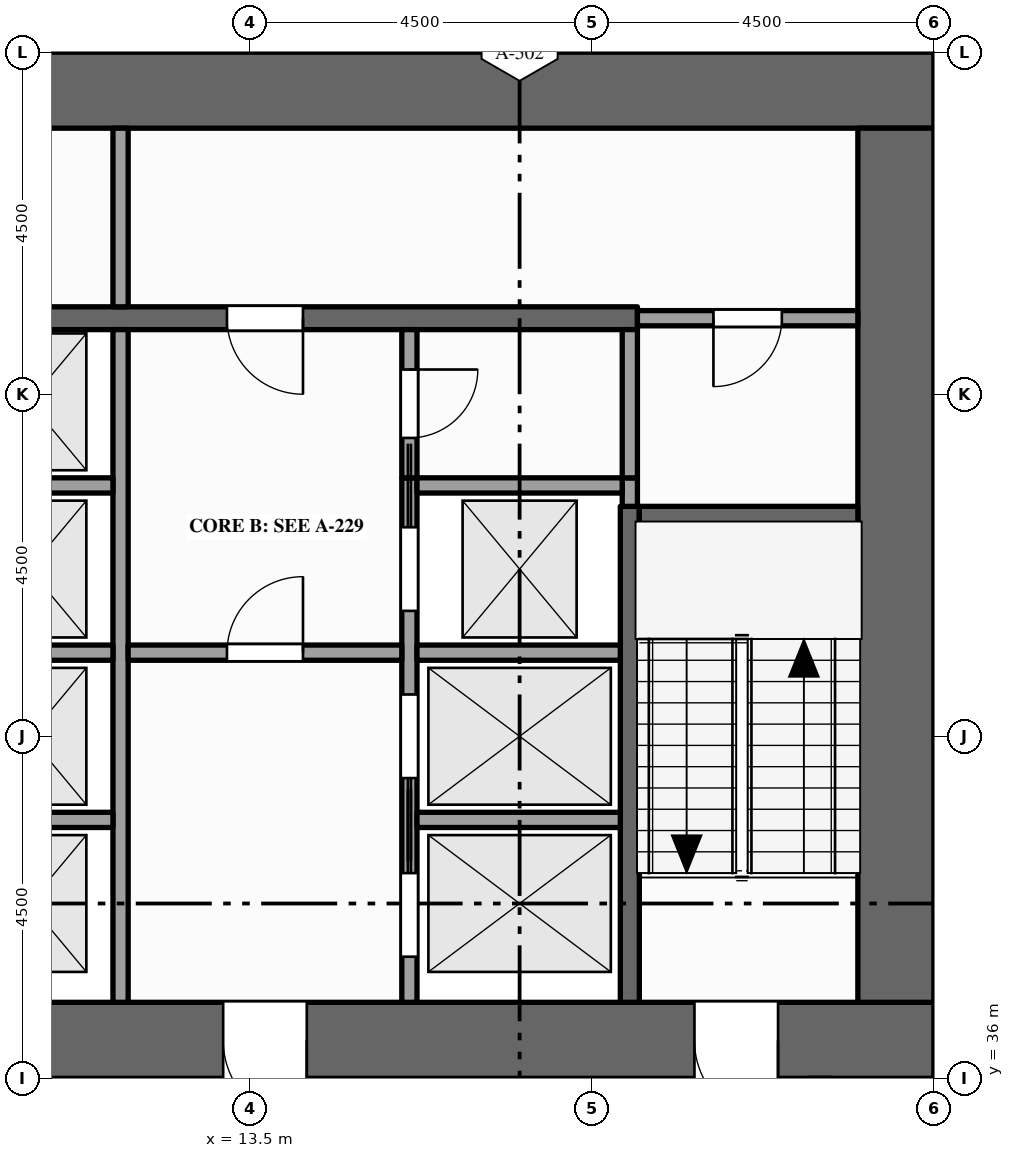
"""IFC4 building model, lengths in metres.
Left out: names, types, materials, properties, quantities, classifications, styles, units other than length and angle.
Written with IfcOpenShell. Run it as: python <this file> out.ifc"""

import sys

from ifc_helpers import new_model, si_unit, direction, frame, frame_2d, origin, place, context, subcontext, project, spatial, rectangle, extrude, element, fill, save


model = new_model("IFC4")
c1 = context("Model", 3, precision=1e-05, world=origin(), true_north=direction((0.0, 1.0)))
c2 = subcontext(c1, "Body", "Model", "MODEL_VIEW")
j1 = project(units=[si_unit("LENGTHUNIT", "METRE"), si_unit("PLANEANGLEUNIT", "RADIAN")], contexts=[c1])
p1 = place(None, origin())
s1 = spatial("IfcSite", under=j1, at=p1, CompositionType="ELEMENT")
p2 = place(p1, origin())
s2 = spatial("IfcBuilding", under=s1, at=p2, CompositionType="ELEMENT")
p3 = place(p2, frame((0.0, 0.0, 155.0)))
s3 = spatial("IfcBuildingStorey", under=s2, at=p3, CompositionType="ELEMENT", Elevation=155.0)
p4 = place(p3, frame((0.0, 36.5, -0.15), z_axis=(0.0, 0.0, 1.0), x_axis=(1.0, 0.0, 0.0)))
e1 = element("IfcWall", 1, at=p4, inside=s3, PredefinedType="SHEAR", context=c2, shape_type="SweptSolid", body=[
    extrude(rectangle(XDim=22.5, YDim=1.0, at=frame_2d((11.25, 0.0))), origin(), (0.0, 0.0, 1.0), 4.0),
])
p5 = place(p4, frame((7.1, 0.0, 0.15)))
e2 = element("IfcOpeningElement", 2, at=p5, cuts=e1, PredefinedType="OPENING", context=c2, shape_type="SweptSolid", body=[
    extrude(rectangle(XDim=1.8, YDim=2.1, at=frame_2d((0.9, 1.05))), frame((0.0, 0.51, 0.0), z_axis=(0.0, -1.0, 0.0), x_axis=(1.0, 0.0, 0.0)), (0.0, 0.0, 1.0), 1.02),
])
p6 = place(p4, frame((13.15, 0.0, 0.15)))
e3 = element("IfcOpeningElement", 3, at=p6, cuts=e1, PredefinedType="OPENING", context=c2, shape_type="SweptSolid", body=[
    extrude(rectangle(XDim=1.1, YDim=2.1, at=frame_2d((0.55, 1.05))), frame((0.0, 0.51, 0.0), z_axis=(0.0, -1.0, 0.0), x_axis=(1.0, 0.0, 0.0)), (0.0, 0.0, 1.0), 1.02),
])
p7 = place(p4, frame((2.15, 0.0, 0.15)))
e4 = element("IfcOpeningElement", 4, at=p7, cuts=e1, PredefinedType="OPENING", context=c2, shape_type="SweptSolid", body=[
    extrude(rectangle(XDim=1.1, YDim=2.1, at=frame_2d((0.55, 1.05))), frame((0.0, 0.51, 0.0), z_axis=(0.0, -1.0, 0.0), x_axis=(1.0, 0.0, 0.0)), (0.0, 0.0, 1.0), 1.02),
])
p8 = place(p4, frame((19.35, 0.0, 0.15)))
e5 = element("IfcOpeningElement", 5, at=p8, cuts=e1, PredefinedType="OPENING", context=c2, shape_type="SweptSolid", body=[
    extrude(rectangle(XDim=1.1, YDim=2.1, at=frame_2d((0.55, 1.05))), frame((0.0, 0.51, 0.0), z_axis=(0.0, -1.0, 0.0), x_axis=(1.0, 0.0, 0.0)), (0.0, 0.0, 1.0), 1.02),
])
p9 = place(p3, frame((0.0, 49.0, -0.15), z_axis=(0.0, 0.0, 1.0), x_axis=(1.0, 0.0, 0.0)))
e6 = element("IfcWall", 6, at=p9, inside=s3, PredefinedType="SHEAR", context=c2, shape_type="SweptSolid", body=[
    extrude(rectangle(XDim=22.5, YDim=1.0, at=frame_2d((11.25, 0.0))), origin(), (0.0, 0.0, 1.0), 4.0),
])
p10 = place(p3, frame((22.0, 37.0, -0.15), z_axis=(0.0, 0.0, 1.0), x_axis=(0.0, 1.0, 0.0)))
e7 = element("IfcWall", 7, at=p10, inside=s3, PredefinedType="SHEAR", context=c2, shape_type="SweptSolid", body=[
    extrude(rectangle(XDim=11.5, YDim=1.0, at=frame_2d((5.75, 0.0))), origin(), (0.0, 0.0, 1.0), 4.0),
])
p11 = place(p3, frame((11.8, 37.0, 0.0), z_axis=(0.0, 0.0, 1.0), x_axis=(0.0, 1.0, 0.0)))
e8 = element("IfcWall", 8, at=p11, inside=s3, PredefinedType="SOLIDWALL", context=c2, shape_type="SweptSolid", body=[
    extrude(rectangle(XDim=8.85, YDim=0.2, at=frame_2d((4.425, 0.0))), origin(), (0.0, 0.0, 1.0), 3.85),
])
p12 = place(p3, frame((11.8, 46.15, 0.0), z_axis=(0.0, 0.0, 1.0), x_axis=(0.0, 1.0, 0.0)))
e9 = element("IfcWall", 9, at=p12, inside=s3, PredefinedType="PARTITIONING", context=c2, shape_type="SweptSolid", body=[
    extrude(rectangle(XDim=2.35, YDim=0.2, at=frame_2d((1.175, 0.0))), origin(), (0.0, 0.0, 1.0), 3.85),
])
p13 = place(p3, frame((15.6, 37.0, 0.0), z_axis=(0.0, 0.0, 1.0), x_axis=(0.0, 1.0, 0.0)))
e10 = element("IfcWall", 10, at=p13, inside=s3, PredefinedType="SOLIDWALL", context=c2, shape_type="SweptSolid", body=[
    extrude(rectangle(XDim=6.9, YDim=0.2, at=frame_2d((3.45, 0.0))), origin(), (0.0, 0.0, 1.0), 3.85),
])
p14 = place(p13, frame((0.6, 0.0, 0.012)))
e11 = element("IfcOpeningElement", 11, at=p14, cuts=e10, PredefinedType="OPENING", context=c2, shape_type="SweptSolid", body=[
    extrude(rectangle(XDim=1.1, YDim=2.1, at=frame_2d((0.55, 1.05))), frame((0.0, 0.11, 0.0), z_axis=(0.0, -1.0, 0.0), x_axis=(1.0, 0.0, 0.0)), (0.0, 0.0, 1.0), 0.22),
])
p15 = place(p13, frame((2.95, 0.0, 0.012)))
e12 = element("IfcOpeningElement", 12, at=p15, cuts=e10, PredefinedType="OPENING", context=c2, shape_type="SweptSolid", body=[
    extrude(rectangle(XDim=1.1, YDim=2.1, at=frame_2d((0.55, 1.05))), frame((0.0, 0.11, 0.0), z_axis=(0.0, -1.0, 0.0), x_axis=(1.0, 0.0, 0.0)), (0.0, 0.0, 1.0), 0.22),
])
p16 = place(p13, frame((5.15, 0.0, 0.012)))
e13 = element("IfcOpeningElement", 13, at=p16, cuts=e10, PredefinedType="OPENING", context=c2, shape_type="SweptSolid", body=[
    extrude(rectangle(XDim=1.1, YDim=2.1, at=frame_2d((0.55, 1.05))), frame((0.0, 0.11, 0.0), z_axis=(0.0, -1.0, 0.0), x_axis=(1.0, 0.0, 0.0)), (0.0, 0.0, 1.0), 0.22),
])
p17 = place(p3, frame((15.6, 43.9, 0.0), z_axis=(0.0, 0.0, 1.0), x_axis=(0.0, 1.0, 0.0)))
e14 = element("IfcWall", 14, at=p17, inside=s3, PredefinedType="PARTITIONING", context=c2, shape_type="SweptSolid", body=[
    extrude(rectangle(XDim=1.95, YDim=0.2, at=frame_2d((0.975, 0.0))), origin(), (0.0, 0.0, 1.0), 3.85),
])
p18 = place(p17, frame((0.525, 0.0, 0.0)))
e15 = element("IfcOpeningElement", 15, at=p18, cuts=e14, PredefinedType="OPENING", context=c2, shape_type="SweptSolid", body=[
    extrude(rectangle(XDim=0.9, YDim=2.1, at=frame_2d((0.45, 1.05))), frame((0.0, 0.11, 0.0), z_axis=(0.0, -1.0, 0.0), x_axis=(1.0, 0.0, 0.0)), (0.0, 0.0, 1.0), 0.22),
])
p19 = place(p3, frame((18.5, 37.0, 0.0), z_axis=(0.0, 0.0, 1.0), x_axis=(0.0, 1.0, 0.0)))
e16 = element("IfcWall", 16, at=p19, inside=s3, PredefinedType="SHEAR", context=c2, shape_type="SweptSolid", body=[
    extrude(rectangle(XDim=6.525, YDim=0.25, at=frame_2d((3.262, 0.0))), origin(), (0.0, 0.0, 1.0), 3.85),
])
p20 = place(p3, frame((18.5, 43.525, 0.0), z_axis=(0.0, 0.0, 1.0), x_axis=(0.0, 1.0, 0.0)))
e17 = element("IfcWall", 17, at=p20, inside=s3, PredefinedType="SOLIDWALL", context=c2, shape_type="SweptSolid", body=[
    extrude(rectangle(XDim=0.375, YDim=0.2, at=frame_2d((0.188, 0.0))), origin(), (0.0, 0.0, 1.0), 3.85),
])
p21 = place(p3, frame((18.5, 43.9, 0.0), z_axis=(0.0, 0.0, 1.0), x_axis=(0.0, 1.0, 0.0)))
e18 = element("IfcWall", 18, at=p21, inside=s3, PredefinedType="PARTITIONING", context=c2, shape_type="SweptSolid", body=[
    extrude(rectangle(XDim=1.95, YDim=0.2, at=frame_2d((0.975, 0.0))), origin(), (0.0, 0.0, 1.0), 3.85),
])
p22 = place(p3, frame((9.5, 39.4, 0.0), z_axis=(0.0, 0.0, 1.0), x_axis=(1.0, 0.0, 0.0)))
e19 = element("IfcWall", 19, at=p22, inside=s3, PredefinedType="SOLIDWALL", context=c2, shape_type="SweptSolid", body=[
    extrude(rectangle(XDim=2.2, YDim=0.2, at=frame_2d((1.1, 0.0))), origin(), (0.0, 0.0, 1.0), 3.85),
])
p23 = place(p3, frame((15.7, 39.4, 0.0), z_axis=(0.0, 0.0, 1.0), x_axis=(1.0, 0.0, 0.0)))
e20 = element("IfcWall", 20, at=p23, inside=s3, PredefinedType="SOLIDWALL", context=c2, shape_type="SweptSolid", body=[
    extrude(rectangle(XDim=2.675, YDim=0.2, at=frame_2d((1.337, 0.0))), origin(), (0.0, 0.0, 1.0), 3.85),
])
p24 = place(p3, frame((9.5, 41.6, 0.0), z_axis=(0.0, 0.0, 1.0), x_axis=(1.0, 0.0, 0.0)))
e21 = element("IfcWall", 21, at=p24, inside=s3, PredefinedType="SOLIDWALL", context=c2, shape_type="SweptSolid", body=[
    extrude(rectangle(XDim=2.2, YDim=0.2, at=frame_2d((1.1, 0.0))), origin(), (0.0, 0.0, 1.0), 3.85),
])
p25 = place(p3, frame((11.9, 41.6, 0.0), z_axis=(0.0, 0.0, 1.0), x_axis=(1.0, 0.0, 0.0)))
e22 = element("IfcWall", 22, at=p25, inside=s3, PredefinedType="PARTITIONING", context=c2, shape_type="SweptSolid", body=[
    extrude(rectangle(XDim=3.6, YDim=0.2, at=frame_2d((1.8, 0.0))), origin(), (0.0, 0.0, 1.0), 3.85),
])
p26 = place(p25, frame((1.3, 0.0, 0.0)))
e23 = element("IfcOpeningElement", 23, at=p26, cuts=e22, PredefinedType="OPENING", context=c2, shape_type="SweptSolid", body=[
    extrude(rectangle(XDim=1.0, YDim=2.1, at=frame_2d((0.5, 1.05))), frame((0.0, 0.11, 0.0), z_axis=(0.0, -1.0, 0.0), x_axis=(1.0, 0.0, 0.0)), (0.0, 0.0, 1.0), 0.22),
])
p27 = place(p3, frame((15.7, 41.6, 0.0), z_axis=(0.0, 0.0, 1.0), x_axis=(1.0, 0.0, 0.0)))
e24 = element("IfcWall", 24, at=p27, inside=s3, PredefinedType="SOLIDWALL", context=c2, shape_type="SweptSolid", body=[
    extrude(rectangle(XDim=2.675, YDim=0.2, at=frame_2d((1.337, 0.0))), origin(), (0.0, 0.0, 1.0), 3.85),
])
p28 = place(p3, frame((18.625, 43.4, 0.0), z_axis=(0.0, 0.0, 1.0), x_axis=(1.0, 0.0, 0.0)))
e25 = element("IfcWall", 25, at=p28, inside=s3, PredefinedType="SHEAR", context=c2, shape_type="SweptSolid", body=[
    extrude(rectangle(XDim=2.875, YDim=0.25, at=frame_2d((1.438, 0.0))), origin(), (0.0, 0.0, 1.0), 3.85),
])
p29 = place(p3, frame((9.5, 43.8, 0.0), z_axis=(0.0, 0.0, 1.0), x_axis=(1.0, 0.0, 0.0)))
e26 = element("IfcWall", 26, at=p29, inside=s3, PredefinedType="SOLIDWALL", context=c2, shape_type="SweptSolid", body=[
    extrude(rectangle(XDim=2.2, YDim=0.2, at=frame_2d((1.1, 0.0))), origin(), (0.0, 0.0, 1.0), 3.85),
])
p30 = place(p3, frame((15.7, 43.8, 0.0), z_axis=(0.0, 0.0, 1.0), x_axis=(1.0, 0.0, 0.0)))
e27 = element("IfcWall", 27, at=p30, inside=s3, PredefinedType="SOLIDWALL", context=c2, shape_type="SweptSolid", body=[
    extrude(rectangle(XDim=2.7, YDim=0.2, at=frame_2d((1.35, 0.0))), origin(), (0.0, 0.0, 1.0), 3.85),
])
p31 = place(p3, frame((4.1, 46.0, 0.0), z_axis=(0.0, 0.0, 1.0), x_axis=(1.0, 0.0, 0.0)))
e28 = element("IfcWall", 28, at=p31, inside=s3, PredefinedType="SHEAR", context=c2, shape_type="SweptSolid", body=[
    extrude(rectangle(XDim=14.5, YDim=0.3, at=frame_2d((7.25, 0.0))), origin(), (0.0, 0.0, 1.0), 3.85),
])
p32 = place(p31, frame((3.4, 0.0, 0.0)))
e29 = element("IfcOpeningElement", 29, at=p32, cuts=e28, PredefinedType="OPENING", context=c2, shape_type="SweptSolid", body=[
    extrude(rectangle(XDim=1.0, YDim=2.1, at=frame_2d((0.5, 1.05))), frame((0.0, 0.16, 0.0), z_axis=(0.0, -1.0, 0.0), x_axis=(1.0, 0.0, 0.0)), (0.0, 0.0, 1.0), 0.32),
])
p33 = place(p31, frame((9.1, 0.0, 0.0)))
e30 = element("IfcOpeningElement", 30, at=p33, cuts=e28, PredefinedType="OPENING", context=c2, shape_type="SweptSolid", body=[
    extrude(rectangle(XDim=1.0, YDim=2.1, at=frame_2d((0.5, 1.05))), frame((0.0, 0.16, 0.0), z_axis=(0.0, -1.0, 0.0), x_axis=(1.0, 0.0, 0.0)), (0.0, 0.0, 1.0), 0.32),
])
p34 = place(p3, frame((18.6, 46.0, 0.0), z_axis=(0.0, 0.0, 1.0), x_axis=(1.0, 0.0, 0.0)))
e31 = element("IfcWall", 31, at=p34, inside=s3, PredefinedType="PARTITIONING", context=c2, shape_type="SweptSolid", body=[
    extrude(rectangle(XDim=2.9, YDim=0.2, at=frame_2d((1.45, 0.0))), origin(), (0.0, 0.0, 1.0), 3.85),
])
p35 = place(p34, frame((1.0, 0.0, 0.0)))
e32 = element("IfcOpeningElement", 32, at=p35, cuts=e31, PredefinedType="OPENING", context=c2, shape_type="SweptSolid", body=[
    extrude(rectangle(XDim=0.9, YDim=2.1, at=frame_2d((0.45, 1.05))), frame((0.0, 0.11, 0.0), z_axis=(0.0, -1.0, 0.0), x_axis=(1.0, 0.0, 0.0)), (0.0, 0.0, 1.0), 0.22),
])
p36 = place(p14, origin())
e33 = element("IfcDoor", 33, at=p36, inside=s3, OperationType="SLIDING_TO_RIGHT", PredefinedType="DOOR", context=c2, shape_type="SweptSolid", body=[
    extrude(rectangle(XDim=1.1, YDim=2.1, at=frame_2d((0.55, 1.05))), frame((0.0, 0.025, 0.0), z_axis=(0.0, -1.0, 0.0), x_axis=(1.0, 0.0, 0.0)), (0.0, 0.0, 1.0), 0.05),
])
fill(e11, e33)
p37 = place(p15, origin())
e34 = element("IfcDoor", 34, at=p37, inside=s3, OperationType="SLIDING_TO_LEFT", PredefinedType="DOOR", context=c2, shape_type="SweptSolid", body=[
    extrude(rectangle(XDim=1.1, YDim=2.1, at=frame_2d((0.55, 1.05))), frame((0.0, 0.025, 0.0), z_axis=(0.0, -1.0, 0.0), x_axis=(1.0, 0.0, 0.0)), (0.0, 0.0, 1.0), 0.05),
])
fill(e12, e34)
p38 = place(p16, origin())
e35 = element("IfcDoor", 35, at=p38, inside=s3, OperationType="SLIDING_TO_RIGHT", PredefinedType="DOOR", context=c2, shape_type="SweptSolid", body=[
    extrude(rectangle(XDim=1.1, YDim=2.1, at=frame_2d((0.55, 1.05))), frame((0.0, 0.025, 0.0), z_axis=(0.0, -1.0, 0.0), x_axis=(1.0, 0.0, 0.0)), (0.0, 0.0, 1.0), 0.05),
])
fill(e13, e35)
p39 = place(p6, origin())
e36 = element("IfcDoor", 36, at=p39, inside=s3, OperationType="SINGLE_SWING_RIGHT", PredefinedType="DOOR", context=c2, shape_type="SweptSolid", body=[
    extrude(rectangle(XDim=1.1, YDim=2.1, at=frame_2d((0.55, 1.05))), frame((0.0, 0.025, 0.0), z_axis=(0.0, -1.0, 0.0), x_axis=(1.0, 0.0, 0.0)), (0.0, 0.0, 1.0), 0.05),
])
fill(e3, e36)
p40 = place(p26, origin())
e37 = element("IfcDoor", 37, at=p40, inside=s3, OperationType="SINGLE_SWING_RIGHT", PredefinedType="DOOR", context=c2, shape_type="SweptSolid", body=[
    extrude(rectangle(XDim=1.0, YDim=2.1, at=frame_2d((0.5, 1.05))), frame((0.0, 0.025, 0.0), z_axis=(0.0, -1.0, 0.0), x_axis=(1.0, 0.0, 0.0)), (0.0, 0.0, 1.0), 0.05),
])
fill(e23, e37)
p41 = place(p33, origin())
e38 = element("IfcDoor", 38, at=p41, inside=s3, OperationType="SINGLE_SWING_RIGHT", PredefinedType="DOOR", context=c2, shape_type="SweptSolid", body=[
    extrude(rectangle(XDim=1.0, YDim=2.1, at=frame_2d((0.5, 1.05))), frame((0.0, 0.025, 0.0), z_axis=(0.0, -1.0, 0.0), x_axis=(1.0, 0.0, 0.0)), (0.0, 0.0, 1.0), 0.05),
])
fill(e30, e38)
p42 = place(p8, origin())
e39 = element("IfcDoor", 39, at=p42, inside=s3, OperationType="SINGLE_SWING_RIGHT", PredefinedType="DOOR", context=c2, shape_type="SweptSolid", body=[
    extrude(rectangle(XDim=1.1, YDim=2.1, at=frame_2d((0.55, 1.05))), frame((0.0, 0.025, 0.0), z_axis=(0.0, -1.0, 0.0), x_axis=(1.0, 0.0, 0.0)), (0.0, 0.0, 1.0), 0.05),
])
fill(e5, e39)
p43 = place(p35, origin())
e40 = element("IfcDoor", 40, at=p43, inside=s3, OperationType="SINGLE_SWING_LEFT", PredefinedType="DOOR", context=c2, shape_type="SweptSolid", body=[
    extrude(rectangle(XDim=0.9, YDim=2.1, at=frame_2d((0.45, 1.05))), frame((0.0, 0.025, 0.0), z_axis=(0.0, -1.0, 0.0), x_axis=(1.0, 0.0, 0.0)), (0.0, 0.0, 1.0), 0.05),
])
fill(e32, e40)
p44 = place(p18, origin())
e41 = element("IfcDoor", 41, at=p44, inside=s3, OperationType="SINGLE_SWING_RIGHT", PredefinedType="DOOR", context=c2, shape_type="SweptSolid", body=[
    extrude(rectangle(XDim=0.9, YDim=2.1, at=frame_2d((0.45, 1.05))), frame((0.0, 0.025, 0.0), z_axis=(0.0, -1.0, 0.0), x_axis=(1.0, 0.0, 0.0)), (0.0, 0.0, 1.0), 0.05),
])
fill(e15, e41)
save(model, sys.argv[1])
